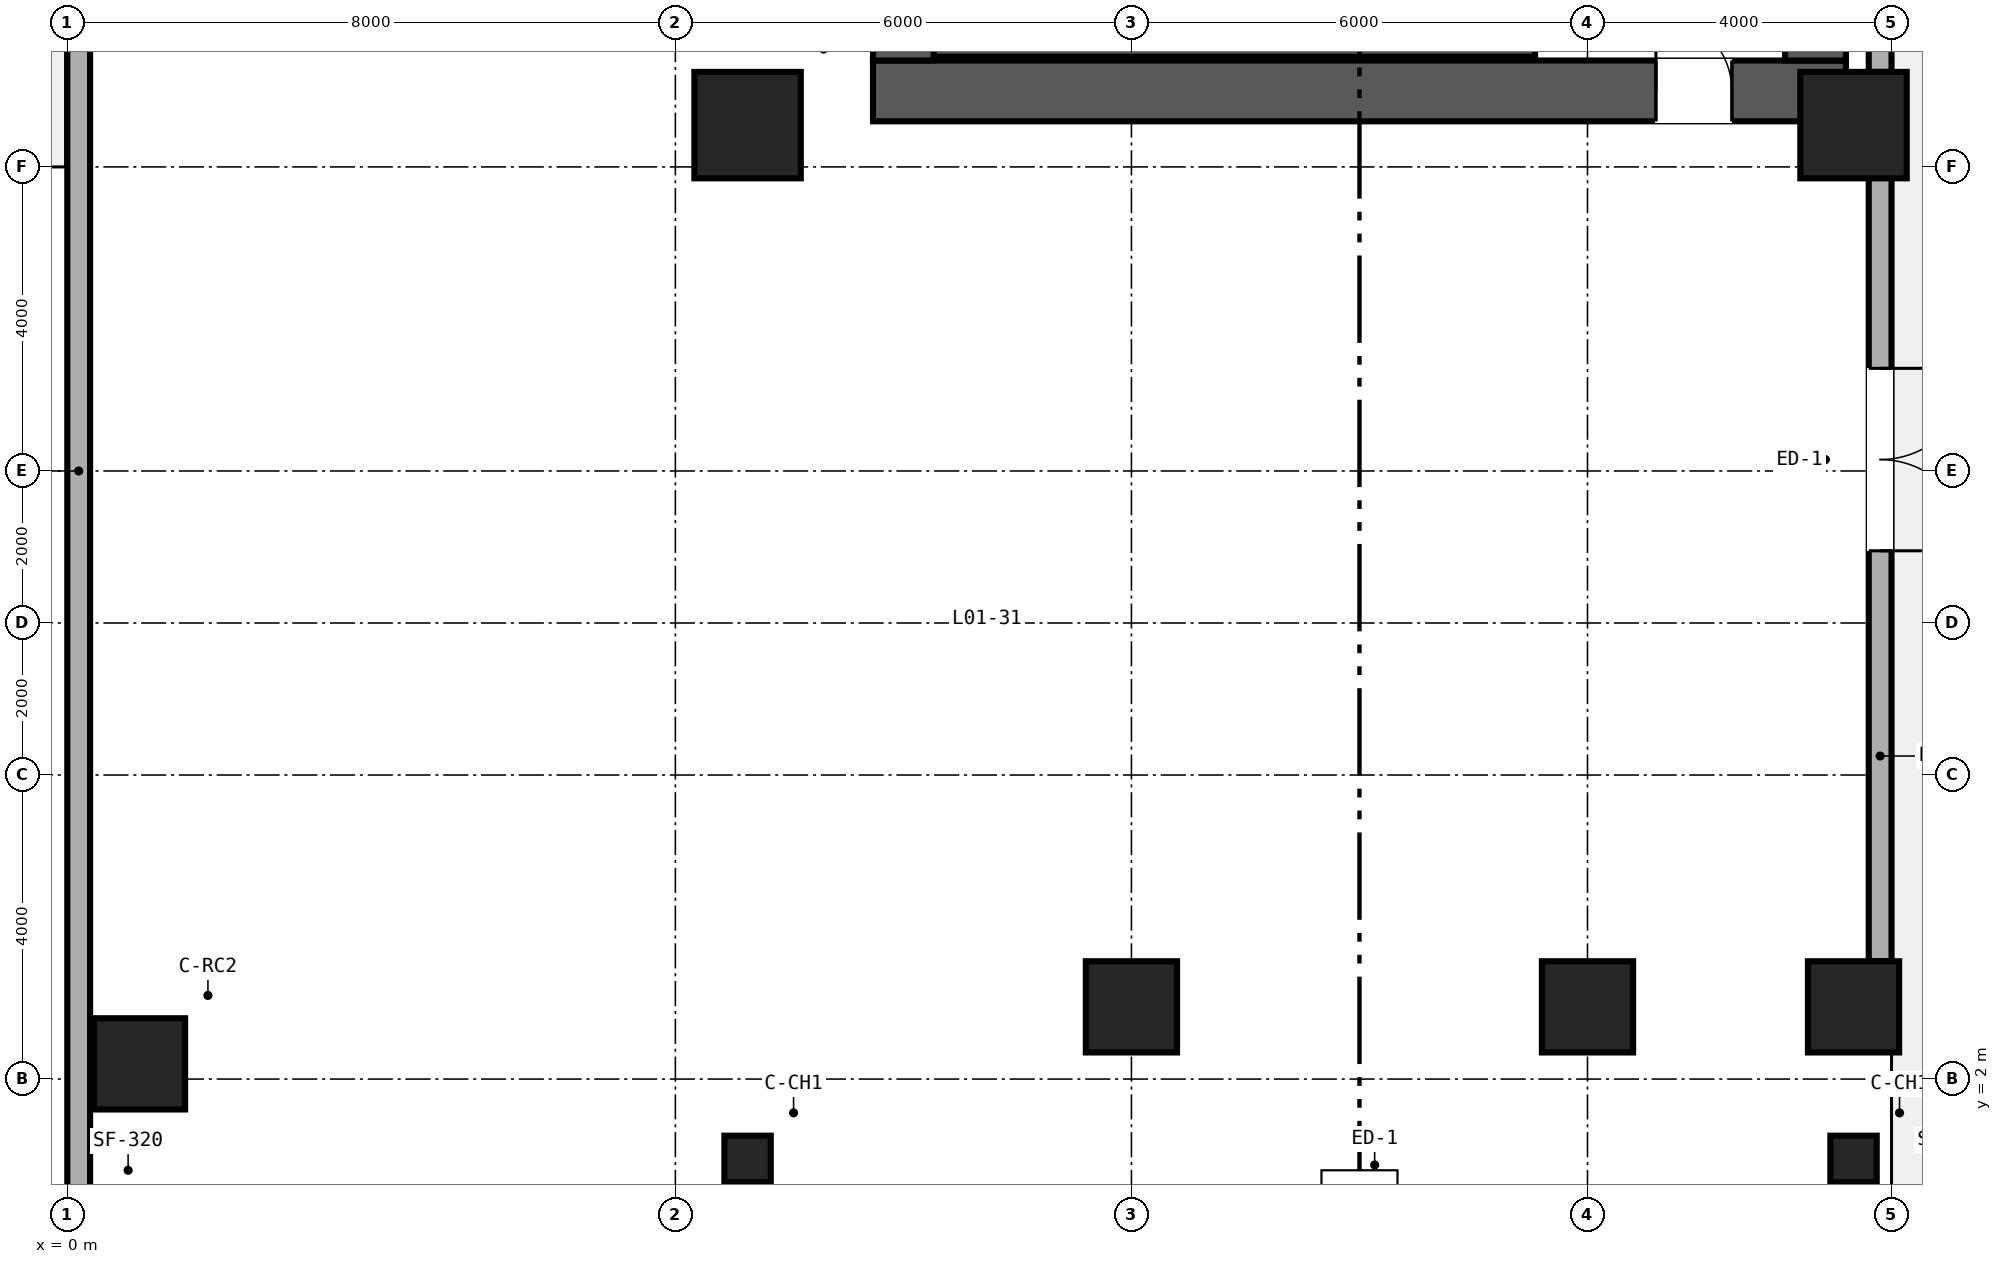
"""IFC4 building model, lengths in metres.
Left out: names, types, materials, properties, quantities, classifications, styles, units other than length and angle.
Written with IfcOpenShell. Run it as: python <this file> out.ifc"""

import sys

from ifc_helpers import new_model, si_unit, direction, frame, frame_2d, origin, origin_2d, place, context, subcontext, project, spatial, rectangle, hollow_circle, extrude, source, transform, mapped, element, fill, save


model = new_model("IFC4")
c1 = context("Model", 3, precision=1e-05, world=origin(), true_north=direction((0.0, 1.0)))
c2 = subcontext(c1, "Body", "Model", "MODEL_VIEW")
j1 = project(units=[si_unit("LENGTHUNIT", "METRE"), si_unit("PLANEANGLEUNIT", "RADIAN")], contexts=[c1])
p1 = place(None, origin())
s1 = spatial("IfcSite", under=j1, at=p1, CompositionType="ELEMENT")
p2 = place(p1, origin())
s2 = spatial("IfcBuilding", under=s1, at=p2, CompositionType="ELEMENT")
p3 = place(p2, origin())
s3 = spatial("IfcBuildingStorey", under=s2, at=p3, CompositionType="ELEMENT", Elevation=0.0)
p4 = place(p3, frame((10.6, 15.0, 0.0), z_axis=(0.0, 0.0, 1.0), x_axis=(1.0, 0.0, 0.0)))
e1 = element("IfcWall", 1, at=p4, inside=s3, PredefinedType="SHEAR", context=c2, shape_type="SweptSolid", body=[
    extrude(rectangle(XDim=12.8, YDim=0.8, at=frame_2d((6.4, 0.0))), origin(), (0.0, 0.0, 1.0), 5.71),
])
p5 = place(p4, frame((10.3, 0.0, 0.0)))
e2 = element("IfcOpeningElement", 2, at=p5, cuts=e1, PredefinedType="OPENING", context=c2, shape_type="SweptSolid", body=[
    extrude(rectangle(XDim=1.0, YDim=2.15, at=frame_2d((0.5, 1.075))), frame((0.0, 0.41, 0.0), z_axis=(0.0, -1.0, 0.0), x_axis=(1.0, 0.0, 0.0)), (0.0, 0.0, 1.0), 0.82),
])
p6 = place(p3, frame((11.0, 15.4, 0.0), z_axis=(0.0, 0.0, 1.0), x_axis=(0.0, 1.0, 0.0)))
e3 = element("IfcWall", 3, at=p6, inside=s3, PredefinedType="SHEAR", context=c2, shape_type="SweptSolid", body=[
    extrude(rectangle(XDim=21.2, YDim=0.8, at=frame_2d((10.6, 0.0))), origin(), (0.0, 0.0, 1.0), 5.71),
])
p7 = place(p6, frame((4.15, 0.0, 0.0)))
e4 = element("IfcOpeningElement", 4, at=p7, cuts=e3, PredefinedType="OPENING", context=c2, shape_type="SweptSolid", body=[
    extrude(rectangle(XDim=1.1, YDim=2.15, at=frame_2d((0.55, 1.075))), frame((0.0, 0.41, 0.0), z_axis=(0.0, -1.0, 0.0), x_axis=(1.0, 0.0, 0.0)), (0.0, 0.0, 1.0), 0.82),
])
p8 = place(p6, frame((16.35, 0.0, 0.0)))
e5 = element("IfcOpeningElement", 5, at=p8, cuts=e3, PredefinedType="OPENING", context=c2, shape_type="SweptSolid", body=[
    extrude(rectangle(XDim=1.1, YDim=2.15, at=frame_2d((0.55, 1.075))), frame((0.0, 0.41, 0.0), z_axis=(0.0, -1.0, 0.0), x_axis=(1.0, 0.0, 0.0)), (0.0, 0.0, 1.0), 0.82),
])
p9 = place(p3, frame((23.0, 15.4, 0.0), z_axis=(0.0, 0.0, 1.0), x_axis=(0.0, 1.0, 0.0)))
e6 = element("IfcWall", 6, at=p9, inside=s3, PredefinedType="SHEAR", context=c2, shape_type="SweptSolid", body=[
    extrude(rectangle(XDim=21.2, YDim=0.8, at=frame_2d((10.6, 0.0))), origin(), (0.0, 0.0, 1.0), 5.71),
])
p10 = place(p3, frame((11.4, 15.56, 0.0), z_axis=(0.0, 0.0, 1.0), x_axis=(1.0, 0.0, 0.0)))
e7 = element("IfcWall", 7, at=p10, inside=s3, PredefinedType="SHEAR", context=c2, shape_type="SweptSolid", body=[
    extrude(rectangle(XDim=7.91, YDim=0.22, at=frame_2d((3.955, 0.0))), origin(), (0.0, 0.0, 1.0), 5.8),
])
m1 = source(origin(), c2, "Body", "SweptSolid", [
    extrude(rectangle(XDim=1.2, YDim=1.2, at=origin_2d()), origin(), (0.0, 0.0, 1.0), 5.71),
])
p11 = place(p3, frame((0.95, 2.2, 0.0), z_axis=(0.0, 0.0, 1.0), x_axis=(1.0, 0.0, 0.0)))
e8 = element("IfcColumn", 8, at=p11, inside=s3, PredefinedType="COLUMN", context=c2, shape_type="MappedRepresentation", body=[
    mapped(m1, transform((0.0, 0.0, 0.0), scale=1.0)),
])
m2 = source(origin(), c2, "Body", "SweptSolid", [
    extrude(hollow_circle(Radius=0.305, WallThickness=0.025, at=origin_2d()), origin(), (0.0, 0.0, 1.0), 5.71),
])
for number, where, z_axis, x_axis in (
    (9, (8.95, 0.95, 0.0), (0.0, 0.0, 1.0), (1.0, 0.0, 0.0)),
    (10, (23.5, 0.95, 0.0), (0.0, 0.0, 1.0), (1.0, 0.0, 0.0)),
):
    element("IfcColumn", number, at=place(p3, frame(where, z_axis=z_axis, x_axis=x_axis)), inside=s3, PredefinedType="COLUMN", context=c2, shape_type="MappedRepresentation", body=[
        mapped(m2, transform((0.0, 0.0, 0.0), scale=1.0)),
    ])
m3 = source(origin(), c2, "Body", "SweptSolid", [
    extrude(rectangle(XDim=1.4, YDim=1.4, at=origin_2d()), origin(), (0.0, 0.0, 1.0), 5.71),
])
for number, where, z_axis, x_axis in (
    (11, (8.95, 14.55, 0.0), (0.0, 0.0, 1.0), (1.0, 0.0, 0.0)),
    (12, (23.5, 14.55, 0.0), (0.0, 0.0, 1.0), (1.0, 0.0, 0.0)),
):
    element("IfcColumn", number, at=place(p3, frame(where, z_axis=z_axis, x_axis=x_axis)), inside=s3, PredefinedType="COLUMN", context=c2, shape_type="MappedRepresentation", body=[
        mapped(m3, transform((0.0, 0.0, 0.0), scale=1.0)),
    ])
for number, where, z_axis, x_axis in (
    (13, (14.0, 2.95, 0.0), (0.0, 0.0, 1.0), (1.0, 0.0, 0.0)),
    (14, (20.0, 2.95, 0.0), (0.0, 0.0, 1.0), (1.0, 0.0, 0.0)),
    (15, (23.5, 2.95, 0.0), (0.0, 0.0, 1.0), (1.0, 0.0, 0.0)),
):
    element("IfcColumn", number, at=place(p3, frame(where, z_axis=z_axis, x_axis=x_axis)), inside=s3, PredefinedType="COLUMN", context=c2, shape_type="MappedRepresentation", body=[
        mapped(m1, transform((0.0, 0.0, 0.0), scale=1.0)),
    ])
p12 = place(p3, frame((0.15, 0.3, 0.0), z_axis=(0.0, 0.0, 1.0), x_axis=(0.0, 1.0, 0.0)))
e16 = element("IfcWall", 16, at=p12, inside=s3, PredefinedType="SOLIDWALL", context=c2, shape_type="SweptSolid", body=[
    extrude(rectangle(XDim=51.4, YDim=0.3, at=frame_2d((25.7, 0.0))), origin(), (0.0, 0.0, 1.0), 5.71),
])
p13 = place(p12, frame((19.4, 0.0, 0.0)))
e17 = element("IfcOpeningElement", 17, at=p13, cuts=e16, PredefinedType="OPENING", context=c2, shape_type="SweptSolid", body=[
    extrude(rectangle(XDim=1.2, YDim=2.2, at=frame_2d((0.6, 1.1))), frame((0.0, 0.16, 0.0), z_axis=(0.0, -1.0, 0.0), x_axis=(1.0, 0.0, 0.0)), (0.0, 0.0, 1.0), 0.32),
])
p14 = place(p12, frame((30.6, 0.0, 0.0)))
e18 = element("IfcOpeningElement", 18, at=p14, cuts=e16, PredefinedType="OPENING", context=c2, shape_type="SweptSolid", body=[
    extrude(rectangle(XDim=1.2, YDim=2.2, at=frame_2d((0.6, 1.1))), frame((0.0, 0.16, 0.0), z_axis=(0.0, -1.0, 0.0), x_axis=(1.0, 0.0, 0.0)), (0.0, 0.0, 1.0), 0.32),
])
p15 = place(p12, frame((40.9, 0.0, 0.0)))
e19 = element("IfcOpeningElement", 19, at=p15, cuts=e16, PredefinedType="OPENING", context=c2, shape_type="SweptSolid", body=[
    extrude(rectangle(XDim=1.2, YDim=2.2, at=frame_2d((0.6, 1.1))), frame((0.0, 0.16, 0.0), z_axis=(0.0, -1.0, 0.0), x_axis=(1.0, 0.0, 0.0)), (0.0, 0.0, 1.0), 0.32),
])
p16 = place(p3, frame((23.85, 13.95, 0.0), z_axis=(0.0, 0.0, 1.0), x_axis=(0.0, -1.0, 0.0)))
e20 = element("IfcWall", 20, at=p16, inside=s3, PredefinedType="SOLIDWALL", context=c2, shape_type="SweptSolid", body=[
    extrude(rectangle(XDim=10.4, YDim=0.3, at=frame_2d((5.2, 0.0))), origin(), (0.0, 0.0, 1.0), 4.931),
])
p17 = place(p16, frame((2.6, 0.0, 0.0)))
e21 = element("IfcOpeningElement", 21, at=p17, cuts=e20, PredefinedType="OPENING", context=c2, shape_type="SweptSolid", body=[
    extrude(rectangle(XDim=2.4, YDim=2.6, at=frame_2d((1.2, 1.3))), frame((0.0, 0.16, 0.0), z_axis=(0.0, -1.0, 0.0), x_axis=(1.0, 0.0, 0.0)), (0.0, 0.0, 1.0), 0.32),
])
p18 = place(p3, frame((23.85, 15.25, 0.0), z_axis=(0.0, 0.0, 1.0), x_axis=(0.0, 1.0, 0.0)))
e22 = element("IfcWall", 22, at=p18, inside=s3, PredefinedType="SOLIDWALL", context=c2, shape_type="SweptSolid", body=[
    extrude(rectangle(XDim=12.2, YDim=0.3, at=frame_2d((6.1, 0.0))), origin(), (0.0, 0.0, 1.0), 4.931),
])
m4 = source(origin(), c2, "Body", "SweptSolid", [
    extrude(rectangle(XDim=2.4, YDim=2.6, at=frame_2d((1.2, 1.3))), frame((0.0, 0.025, 0.0), z_axis=(0.0, -1.0, 0.0), x_axis=(1.0, 0.0, 0.0)), (0.0, 0.0, 1.0), 0.05),
])
p19 = place(p17, origin())
e23 = element("IfcDoor", 23, at=p19, inside=s3, OperationType="DOUBLE_DOOR_SINGLE_SWING", PredefinedType="DOOR", context=c2, shape_type="MappedRepresentation", body=[
    mapped(m4, transform((0.0, 0.0, 0.0), scale=1.0)),
])
fill(e21, e23)
m5 = source(origin(), c2, "Body", "SweptSolid", [
    extrude(rectangle(XDim=1.0, YDim=2.15, at=frame_2d((0.5, 1.075))), frame((0.0, 0.025, 0.0), z_axis=(0.0, -1.0, 0.0), x_axis=(1.0, 0.0, 0.0)), (0.0, 0.0, 1.0), 0.05),
])
p20 = place(p5, origin())
e24 = element("IfcDoor", 24, at=p20, inside=s3, OperationType="SINGLE_SWING_LEFT", PredefinedType="DOOR", context=c2, shape_type="MappedRepresentation", body=[
    mapped(m5, transform((0.0, 0.0, 0.0), scale=1.0)),
])
fill(e2, e24)
save(model, sys.argv[1])
